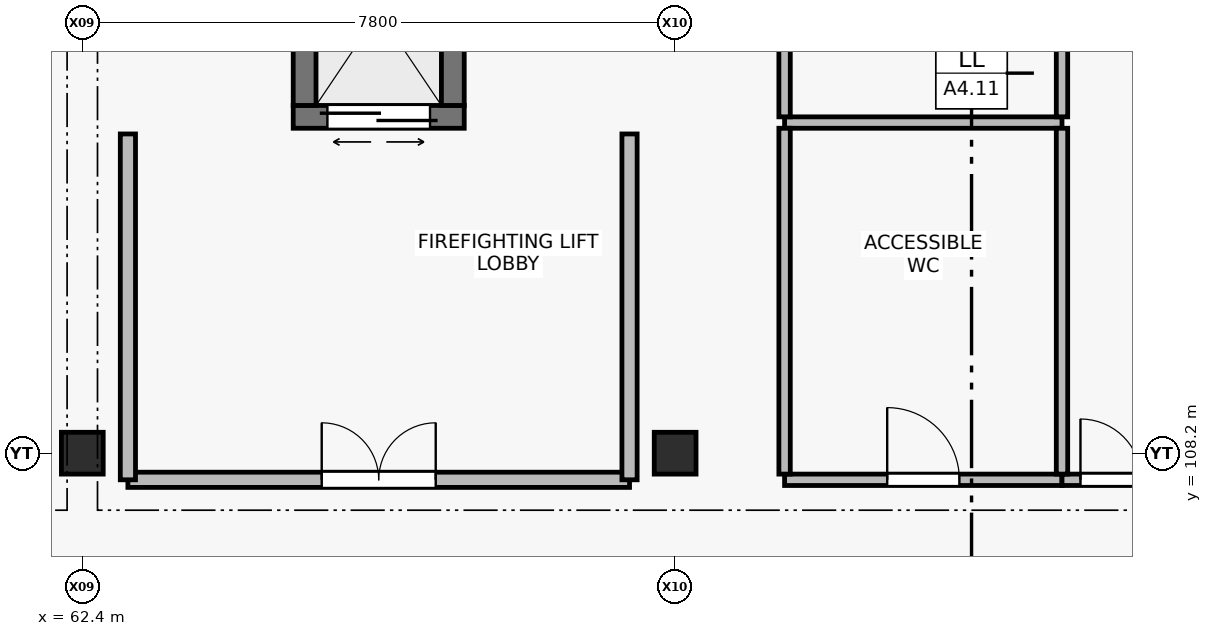
"""IFC4 building model, lengths in metres.
Left out: names, types, materials, properties, quantities, classifications, styles, units other than length and angle.
Written with IfcOpenShell. Run it as: python <this file> out.ifc"""

import sys

from ifc_helpers import new_model, si_unit, direction, frame, frame_2d, origin, origin_2d, place, context, subcontext, project, spatial, rectangle, extrude, element, fill, save


model = new_model("IFC4")
c1 = context("Model", 3, precision=1e-05, world=origin(), true_north=direction((0.0, 1.0)))
c2 = subcontext(c1, "Body", "Model", "MODEL_VIEW")
j1 = project(units=[si_unit("LENGTHUNIT", "METRE"), si_unit("PLANEANGLEUNIT", "RADIAN")], contexts=[c1])
p1 = place(None, origin())
s1 = spatial("IfcSite", under=j1, at=p1, CompositionType="ELEMENT")
p2 = place(p1, origin())
s2 = spatial("IfcBuilding", under=s1, at=p2, CompositionType="ELEMENT")
p3 = place(p2, frame((0.0, 0.0, 9.6)))
s3 = spatial("IfcBuildingStorey", under=s2, at=p3, CompositionType="ELEMENT", Elevation=9.6)
for number, where, z_axis, x_axis in (
    (1, (62.4, 108.2, 0.0), (0.0, 0.0, 1.0), (1.0, 0.0, 0.0)),
    (2, (70.2, 108.2, 0.0), (0.0, 0.0, 1.0), (1.0, 0.0, 0.0)),
):
    element("IfcColumn", number, at=place(p3, frame(where, z_axis=z_axis, x_axis=x_axis)), inside=s3, PredefinedType="COLUMN", context=c2, shape_type="SweptSolid", body=[
        extrude(rectangle(XDim=0.55, YDim=0.55, at=origin_2d()), origin(), (0.0, 0.0, 1.0), 4.5),
    ])
p4 = place(p3, frame((65.175, 112.625, 0.0), z_axis=(0.0, 0.0, 1.0), x_axis=(1.0, 0.0, 0.0)))
e3 = element("IfcWall", 3, at=p4, inside=s3, PredefinedType="SHEAR", context=c2, shape_type="SweptSolid", body=[
    extrude(rectangle(XDim=2.25, YDim=0.3, at=frame_2d((1.125, 0.0))), origin(), (0.0, 0.0, 1.0), 4.24),
])
p5 = place(p4, frame((0.45, 0.0, 0.0)))
e4 = element("IfcOpeningElement", 4, at=p5, cuts=e3, PredefinedType="OPENING", context=c2, shape_type="SweptSolid", body=[
    extrude(rectangle(XDim=1.35, YDim=2.3, at=frame_2d((0.675, 1.15))), frame((0.0, 0.16, 0.0), z_axis=(0.0, -1.0, 0.0), x_axis=(1.0, 0.0, 0.0)), (0.0, 0.0, 1.0), 0.32),
])
for number, where, z_axis, x_axis in (
    (5, (65.325, 115.225, 0.0), (0.0, 0.0, 1.0), (0.0, -1.0, 0.0)),
    (6, (67.275, 112.775, 0.0), (0.0, 0.0, 1.0), (0.0, 1.0, 0.0)),
):
    element("IfcWall", number, at=place(p3, frame(where, z_axis=z_axis, x_axis=x_axis)), inside=s3, PredefinedType="SHEAR", context=c2, shape_type="SweptSolid", body=[
        extrude(rectangle(XDim=2.45, YDim=0.3, at=frame_2d((1.225, 0.0))), origin(), (0.0, 0.0, 1.0), 4.24),
    ])
p6 = place(p3, frame((63.0, 107.85, 0.0), z_axis=(0.0, 0.0, 1.0), x_axis=(1.0, 0.0, 0.0)))
e7 = element("IfcWall", 7, at=p6, inside=s3, PredefinedType="SOLIDWALL", context=c2, shape_type="SweptSolid", body=[
    extrude(rectangle(XDim=6.6, YDim=0.2, at=frame_2d((3.3, 0.0))), origin(), (0.0, 0.0, 1.0), 3.74),
])
p7 = place(p6, frame((2.55, 0.0, 0.0)))
e8 = element("IfcOpeningElement", 8, at=p7, cuts=e7, PredefinedType="OPENING", context=c2, shape_type="SweptSolid", body=[
    extrude(rectangle(XDim=1.5, YDim=2.2, at=frame_2d((0.75, 1.1))), frame((0.0, 0.11, 0.0), z_axis=(0.0, -1.0, 0.0), x_axis=(1.0, 0.0, 0.0)), (0.0, 0.0, 1.0), 0.22),
])
for number, where, z_axis, x_axis in (
    (9, (63.0, 112.4, 0.0), (0.0, 0.0, 1.0), (0.0, -1.0, 0.0)),
    (10, (69.6, 107.85, 0.0), (0.0, 0.0, 1.0), (0.0, 1.0, 0.0)),
):
    element("IfcWall", number, at=place(p3, frame(where, z_axis=z_axis, x_axis=x_axis)), inside=s3, PredefinedType="SOLIDWALL", context=c2, shape_type="SweptSolid", body=[
        extrude(rectangle(XDim=4.55, YDim=0.2, at=frame_2d((2.275, 0.0))), origin(), (0.0, 0.0, 1.0), 4.24),
    ])
p8 = place(p3, frame((71.64, 107.85, 0.0), z_axis=(0.0, 0.0, 1.0), x_axis=(1.0, 0.0, 0.0)))
e11 = element("IfcWall", 11, at=p8, inside=s3, PredefinedType="PARTITIONING", context=c2, shape_type="SweptSolid", body=[
    extrude(rectangle(XDim=3.65, YDim=0.15, at=frame_2d((1.825, 0.0))), origin(), (0.0, 0.0, 1.0), 3.74),
])
p9 = place(p8, frame((1.35, 0.0, 0.0)))
e12 = element("IfcOpeningElement", 12, at=p9, cuts=e11, PredefinedType="OPENING", context=c2, shape_type="SweptSolid", body=[
    extrude(rectangle(XDim=0.95, YDim=2.1, at=frame_2d((0.475, 1.05))), frame((0.0, 0.085, 0.0), z_axis=(0.0, -1.0, 0.0), x_axis=(1.0, 0.0, 0.0)), (0.0, 0.0, 1.0), 0.17),
])
p10 = place(p3, frame((71.64, 112.55, 0.0), z_axis=(0.0, 0.0, 1.0), x_axis=(1.0, 0.0, 0.0)))
e13 = element("IfcWall", 13, at=p10, inside=s3, PredefinedType="PARTITIONING", context=c2, shape_type="SweptSolid", body=[
    extrude(rectangle(XDim=3.65, YDim=0.15, at=frame_2d((1.825, 0.0))), origin(), (0.0, 0.0, 1.0), 4.24),
])
p11 = place(p3, frame((75.29, 107.85, 0.0), z_axis=(0.0, 0.0, 1.0), x_axis=(1.0, 0.0, 0.0)))
e14 = element("IfcWall", 14, at=p11, inside=s3, PredefinedType="PARTITIONING", context=c2, shape_type="SweptSolid", body=[
    extrude(rectangle(XDim=2.98, YDim=0.15, at=frame_2d((1.49, 0.0))), origin(), (0.0, 0.0, 1.0), 3.74),
])
p12 = place(p11, frame((0.243, 0.0, 0.0)))
e15 = element("IfcOpeningElement", 15, at=p12, cuts=e14, PredefinedType="OPENING", context=c2, shape_type="SweptSolid", body=[
    extrude(rectangle(XDim=1.6, YDim=2.2, at=frame_2d((0.8, 1.1))), frame((0.0, 0.085, 0.0), z_axis=(0.0, -1.0, 0.0), x_axis=(1.0, 0.0, 0.0)), (0.0, 0.0, 1.0), 0.17),
])
p13 = place(p3, frame((71.64, 107.925, 0.0), z_axis=(0.0, 0.0, 1.0), x_axis=(0.0, 1.0, 0.0)))
e16 = element("IfcWall", 16, at=p13, inside=s3, PredefinedType="PARTITIONING", context=c2, shape_type="SweptSolid", body=[
    extrude(rectangle(XDim=4.55, YDim=0.15, at=frame_2d((2.275, 0.0))), origin(), (0.0, 0.0, 1.0), 4.24),
])
p14 = place(p3, frame((75.29, 107.925, 0.0), z_axis=(0.0, 0.0, 1.0), x_axis=(0.0, 1.0, 0.0)))
e17 = element("IfcWall", 17, at=p14, inside=s3, PredefinedType="PARTITIONING", context=c2, shape_type="SweptSolid", body=[
    extrude(rectangle(XDim=4.55, YDim=0.15, at=frame_2d((2.275, 0.0))), origin(), (0.0, 0.0, 1.0), 3.94),
])
p15 = place(p3, frame((75.29, 112.625, 0.0), z_axis=(0.0, 0.0, 1.0), x_axis=(0.0, 1.0, 0.0)))
e18 = element("IfcWall", 18, at=p15, inside=s3, PredefinedType="PARTITIONING", context=c2, shape_type="SweptSolid", body=[
    extrude(rectangle(XDim=3.185, YDim=0.15, at=frame_2d((1.593, 0.0))), origin(), (0.0, 0.0, 1.0), 3.94),
])
p16 = place(p3, frame((71.64, 112.625, 0.0), z_axis=(0.0, 0.0, 1.0), x_axis=(0.0, 1.0, 0.0)))
e19 = element("IfcWall", 19, at=p16, inside=s3, PredefinedType="PARTITIONING", context=c2, shape_type="SweptSolid", body=[
    extrude(rectangle(XDim=3.185, YDim=0.15, at=frame_2d((1.593, 0.0))), origin(), (0.0, 0.0, 1.0), 4.24),
])
p17 = place(p5, origin())
e20 = element("IfcDoor", 20, at=p17, inside=s3, OperationType="DOUBLE_DOOR_SLIDING", PredefinedType="DOOR", context=c2, shape_type="SweptSolid", body=[
    extrude(rectangle(XDim=1.35, YDim=2.3, at=frame_2d((0.675, 1.15))), frame((0.0, 0.025, 0.0), z_axis=(0.0, -1.0, 0.0), x_axis=(1.0, 0.0, 0.0)), (0.0, 0.0, 1.0), 0.05),
])
fill(e4, e20)
p18 = place(p7, origin())
e21 = element("IfcDoor", 21, at=p18, inside=s3, OperationType="DOUBLE_DOOR_SINGLE_SWING", PredefinedType="DOOR", context=c2, shape_type="SweptSolid", body=[
    extrude(rectangle(XDim=1.5, YDim=2.2, at=frame_2d((0.75, 1.1))), frame((0.0, 0.025, 0.0), z_axis=(0.0, -1.0, 0.0), x_axis=(1.0, 0.0, 0.0)), (0.0, 0.0, 1.0), 0.05),
])
fill(e8, e21)
p19 = place(p9, origin())
e22 = element("IfcDoor", 22, at=p19, inside=s3, OperationType="SINGLE_SWING_LEFT", PredefinedType="DOOR", context=c2, shape_type="SweptSolid", body=[
    extrude(rectangle(XDim=0.95, YDim=2.1, at=frame_2d((0.475, 1.05))), frame((0.0, 0.025, 0.0), z_axis=(0.0, -1.0, 0.0), x_axis=(1.0, 0.0, 0.0)), (0.0, 0.0, 1.0), 0.05),
])
fill(e12, e22)
p20 = place(p12, origin())
e23 = element("IfcDoor", 23, at=p20, inside=s3, OperationType="DOUBLE_DOOR_SINGLE_SWING", PredefinedType="DOOR", context=c2, shape_type="SweptSolid", body=[
    extrude(rectangle(XDim=1.6, YDim=2.2, at=frame_2d((0.8, 1.1))), frame((0.0, 0.025, 0.0), z_axis=(0.0, -1.0, 0.0), x_axis=(1.0, 0.0, 0.0)), (0.0, 0.0, 1.0), 0.05),
])
fill(e15, e23)
save(model, sys.argv[1])
